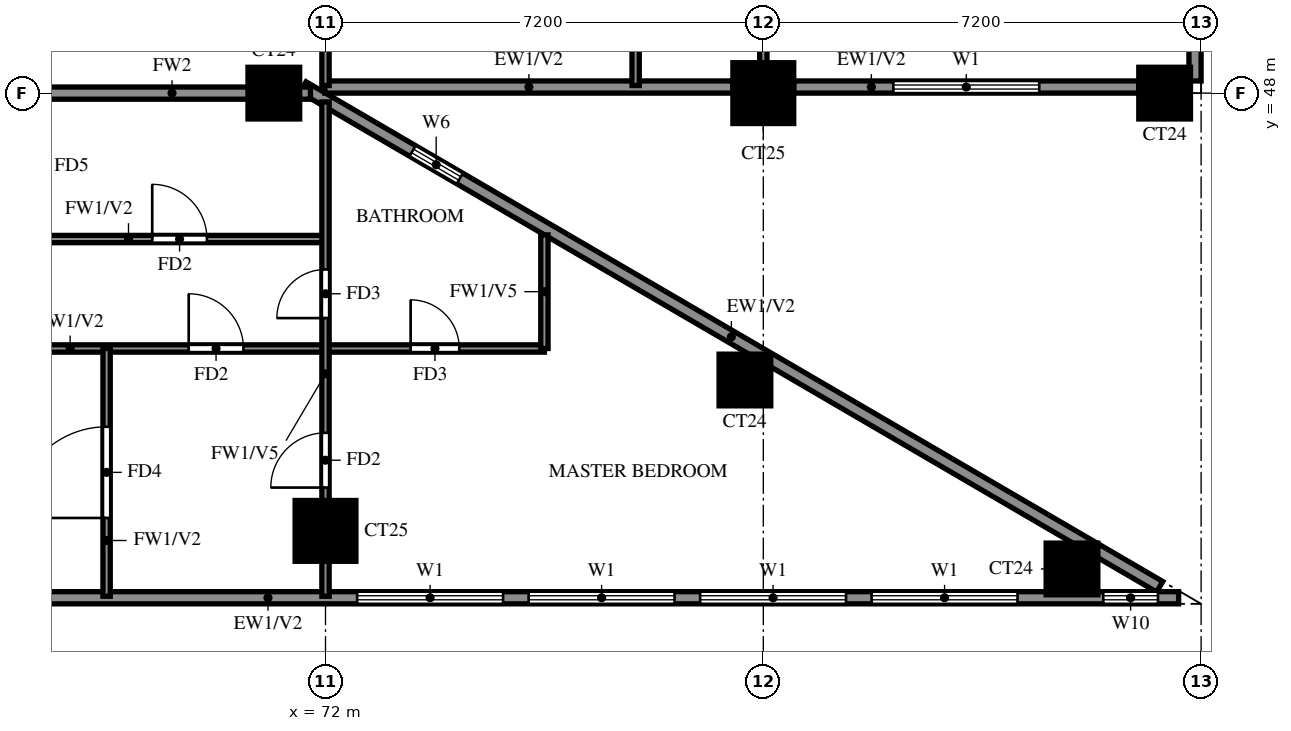
"""IFC4 building model, lengths in metres.
Left out: names, types, materials, properties, quantities, classifications, styles, units other than length and angle.
Written with IfcOpenShell. Run it as: python <this file> out.ifc"""

import sys

from ifc_helpers import new_model, si_unit, direction, frame, frame_2d, origin, origin_2d, place, context, subcontext, project, spatial, rectangle, extrude, source, transform, mapped, element, fill, save


model = new_model("IFC4")
c1 = context("Model", 3, precision=1e-05, world=origin(), true_north=direction((0.0, 1.0)))
c2 = subcontext(c1, "Body", "Model", "MODEL_VIEW")
j1 = project(units=[si_unit("LENGTHUNIT", "METRE"), si_unit("PLANEANGLEUNIT", "RADIAN")], contexts=[c1])
p1 = place(None, origin())
s1 = spatial("IfcSite", under=j1, at=p1, CompositionType="ELEMENT")
p2 = place(p1, origin())
s2 = spatial("IfcBuilding", under=s1, at=p2, CompositionType="ELEMENT")
p3 = place(p2, frame((0.0, 0.0, 164.0)))
s3 = spatial("IfcBuildingStorey", under=s2, at=p3, CompositionType="ELEMENT", Elevation=164.0)
m1 = source(origin(), c2, "Body", "SweptSolid", [
    extrude(rectangle(XDim=0.85, YDim=0.85, at=origin_2d()), origin(), (0.0, 0.0, 1.0), 3.2),
])
p4 = place(p3, frame((84.276, 40.174, 0.0), z_axis=(0.0, 0.0, 1.0), x_axis=(1.0, 0.0, 0.0)))
e1 = element("IfcColumn", 1, at=p4, inside=s3, PredefinedType="COLUMN", context=c2, shape_type="MappedRepresentation", body=[
    mapped(m1, transform((0.0, 0.0, 0.0))),
])
m2 = source(origin(), c2, "Body", "SweptSolid", [
    extrude(rectangle(XDim=1.0, YDim=1.0, at=origin_2d()), origin(), (0.0, 0.0, 1.0), 3.2),
])
p5 = place(p3, frame((72.0, 40.8, 0.0), z_axis=(0.0, 0.0, 1.0), x_axis=(1.0, 0.0, 0.0)))
e2 = element("IfcColumn", 2, at=p5, inside=s3, PredefinedType="COLUMN", context=c2, shape_type="MappedRepresentation", body=[
    mapped(m2, transform((0.0, 0.0, 0.0))),
])
for number, where, z_axis, x_axis in (
    (3, (78.898, 43.282, 0.0), (0.0, 0.0, 1.0), (1.0, 0.0, 0.0)),
    (4, (71.15, 48.0, 0.0), (0.0, 0.0, 1.0), (1.0, 0.0, 0.0)),
):
    element("IfcColumn", number, at=place(p3, frame(where, z_axis=z_axis, x_axis=x_axis)), inside=s3, PredefinedType="COLUMN", context=c2, shape_type="MappedRepresentation", body=[
        mapped(m1, transform((0.0, 0.0, 0.0))),
    ])
p6 = place(p3, frame((79.2, 48.0, 0.0), z_axis=(0.0, 0.0, 1.0), x_axis=(1.0, 0.0, 0.0)))
e5 = element("IfcColumn", 5, at=p6, inside=s3, PredefinedType="COLUMN", context=c2, shape_type="MappedRepresentation", body=[
    mapped(m2, transform((0.0, 0.0, 0.0))),
])
p7 = place(p3, frame((85.8, 48.0, 0.0), z_axis=(0.0, 0.0, 1.0), x_axis=(1.0, 0.0, 0.0)))
e6 = element("IfcColumn", 6, at=p7, inside=s3, PredefinedType="COLUMN", context=c2, shape_type="MappedRepresentation", body=[
    mapped(m1, transform((0.0, 0.0, 0.0))),
])
p8 = place(p3, frame((85.719, 39.881, 0.0), z_axis=(0.0, 0.0, 1.0), x_axis=(-0.86377618652, 0.503875678716, 0.0)))
e7 = element("IfcWall", 7, at=p8, inside=s3, PredefinedType="SOLIDWALL", context=c2, shape_type="SweptSolid", body=[
    extrude(rectangle(XDim=16.311, YDim=0.2, at=frame_2d((8.156, 0.0))), origin(), (0.0, 0.0, 1.0), 3.2),
])
p9 = place(p8, frame((13.326, 0.0, 1.5)))
e8 = element("IfcOpeningElement", 8, at=p9, cuts=e7, PredefinedType="OPENING", context=c2, shape_type="SweptSolid", body=[
    extrude(rectangle(XDim=0.9, YDim=0.9, at=frame_2d((0.45, 0.45))), frame((0.0, 0.11, 0.0), z_axis=(0.0, -1.0, 0.0), x_axis=(1.0, 0.0, 0.0)), (0.0, 0.0, 1.0), 0.22),
])
p10 = place(p3, frame((71.99, 48.1, 0.0), z_axis=(0.0, 0.0, 1.0), x_axis=(1.0, 0.0, 0.0)))
e9 = element("IfcWall", 9, at=p10, inside=s3, PredefinedType="SOLIDWALL", context=c2, shape_type="SweptSolid", body=[
    extrude(rectangle(XDim=6.71, YDim=0.2, at=frame_2d((3.355, 0.0))), origin(), (0.0, 0.0, 1.0), 3.2),
])
p11 = place(p3, frame((79.7, 48.1, 0.0), z_axis=(0.0, 0.0, 1.0), x_axis=(1.0, 0.0, 0.0)))
e10 = element("IfcWall", 10, at=p11, inside=s3, PredefinedType="SOLIDWALL", context=c2, shape_type="SweptSolid", body=[
    extrude(rectangle(XDim=5.675, YDim=0.2, at=frame_2d((2.837, 0.0))), origin(), (0.0, 0.0, 1.0), 3.2),
])
p12 = place(p11, frame((1.637, 0.0, 0.6)))
e11 = element("IfcOpeningElement", 11, at=p12, cuts=e10, PredefinedType="OPENING", context=c2, shape_type="SweptSolid", body=[
    extrude(rectangle(XDim=2.4, YDim=2.4, at=frame_2d((1.2, 1.2))), frame((0.0, 0.11, 0.0), z_axis=(0.0, -1.0, 0.0), x_axis=(1.0, 0.0, 0.0)), (0.0, 0.0, 1.0), 0.22),
])
p13 = place(p3, frame((86.3, 48.2, 0.0), z_axis=(0.0, 0.0, 1.0), x_axis=(0.0, 1.0, 0.0)))
e12 = element("IfcWall", 12, at=p13, inside=s3, PredefinedType="SOLIDWALL", context=c2, shape_type="SweptSolid", body=[
    extrude(rectangle(XDim=28.6, YDim=0.2, at=frame_2d((14.3, 0.0))), origin(), (0.0, 0.0, 1.0), 3.2),
])
p14 = place(p13, frame((0.775, 0.0, 0.6)))
e13 = element("IfcOpeningElement", 13, at=p14, cuts=e12, PredefinedType="OPENING", context=c2, shape_type="SweptSolid", body=[
    extrude(rectangle(XDim=2.4, YDim=2.4, at=frame_2d((1.2, 1.2))), frame((0.0, 0.11, 0.0), z_axis=(0.0, -1.0, 0.0), x_axis=(1.0, 0.0, 0.0)), (0.0, 0.0, 1.0), 0.22),
])
p15 = place(p13, frame((3.65, 0.0, 0.6)))
e14 = element("IfcOpeningElement", 14, at=p15, cuts=e12, PredefinedType="OPENING", context=c2, shape_type="SweptSolid", body=[
    extrude(rectangle(XDim=2.4, YDim=2.4, at=frame_2d((1.2, 1.2))), frame((0.0, 0.11, 0.0), z_axis=(0.0, -1.0, 0.0), x_axis=(1.0, 0.0, 0.0)), (0.0, 0.0, 1.0), 0.22),
])
p16 = place(p13, frame((11.012, 0.0, 0.6)))
e15 = element("IfcOpeningElement", 15, at=p16, cuts=e12, PredefinedType="OPENING", context=c2, shape_type="SweptSolid", body=[
    extrude(rectangle(XDim=2.4, YDim=2.4, at=frame_2d((1.2, 1.2))), frame((0.0, 0.11, 0.0), z_axis=(0.0, -1.0, 0.0), x_axis=(1.0, 0.0, 0.0)), (0.0, 0.0, 1.0), 0.22),
])
p17 = place(p13, frame((8.538, 0.0, 1.5)))
e16 = element("IfcOpeningElement", 16, at=p17, cuts=e12, PredefinedType="OPENING", context=c2, shape_type="SweptSolid", body=[
    extrude(rectangle(XDim=0.9, YDim=0.9, at=frame_2d((0.45, 0.45))), frame((0.0, 0.11, 0.0), z_axis=(0.0, -1.0, 0.0), x_axis=(1.0, 0.0, 0.0)), (0.0, 0.0, 1.0), 0.22),
])
p18 = place(p13, frame((14.988, 0.0, 0.6)))
e17 = element("IfcOpeningElement", 17, at=p18, cuts=e12, PredefinedType="OPENING", context=c2, shape_type="SweptSolid", body=[
    extrude(rectangle(XDim=2.4, YDim=2.4, at=frame_2d((1.2, 1.2))), frame((0.0, 0.11, 0.0), z_axis=(0.0, -1.0, 0.0), x_axis=(1.0, 0.0, 0.0)), (0.0, 0.0, 1.0), 0.22),
])
p19 = place(p13, frame((18.212, 0.0, 0.6)))
e18 = element("IfcOpeningElement", 18, at=p19, cuts=e12, PredefinedType="OPENING", context=c2, shape_type="SweptSolid", body=[
    extrude(rectangle(XDim=2.4, YDim=2.4, at=frame_2d((1.2, 1.2))), frame((0.0, 0.11, 0.0), z_axis=(0.0, -1.0, 0.0), x_axis=(1.0, 0.0, 0.0)), (0.0, 0.0, 1.0), 0.22),
])
p20 = place(p13, frame((22.938, 0.0, 1.5)))
e19 = element("IfcOpeningElement", 19, at=p20, cuts=e12, PredefinedType="OPENING", context=c2, shape_type="SweptSolid", body=[
    extrude(rectangle(XDim=0.9, YDim=0.9, at=frame_2d((0.45, 0.45))), frame((0.0, 0.11, 0.0), z_axis=(0.0, -1.0, 0.0), x_axis=(1.0, 0.0, 0.0)), (0.0, 0.0, 1.0), 0.22),
])
p21 = place(p13, frame((25.413, 0.0, 0.6)))
e20 = element("IfcOpeningElement", 20, at=p21, cuts=e12, PredefinedType="OPENING", context=c2, shape_type="SweptSolid", body=[
    extrude(rectangle(XDim=2.4, YDim=2.4, at=frame_2d((1.2, 1.2))), frame((0.0, 0.11, 0.0), z_axis=(0.0, -1.0, 0.0), x_axis=(1.0, 0.0, 0.0)), (0.0, 0.0, 1.0), 0.22),
])
p22 = place(p3, frame((58.8, 39.7, 0.0), z_axis=(0.0, 0.0, 1.0), x_axis=(1.0, 0.0, 0.0)))
e21 = element("IfcWall", 21, at=p22, inside=s3, PredefinedType="SOLIDWALL", context=c2, shape_type="SweptSolid", body=[
    extrude(rectangle(XDim=27.23, YDim=0.2, at=frame_2d((13.615, 0.0))), origin(), (0.0, 0.0, 1.0), 3.2),
])
p23 = place(p22, frame((2.433, 0.0, 0.6)))
e22 = element("IfcOpeningElement", 22, at=p23, cuts=e21, PredefinedType="OPENING", context=c2, shape_type="SweptSolid", body=[
    extrude(rectangle(XDim=2.4, YDim=2.4, at=frame_2d((1.2, 1.2))), frame((0.0, 0.11, 0.0), z_axis=(0.0, -1.0, 0.0), x_axis=(1.0, 0.0, 0.0)), (0.0, 0.0, 1.0), 0.22),
])
p24 = place(p22, frame((5.967, 0.0, 0.6)))
e23 = element("IfcOpeningElement", 23, at=p24, cuts=e21, PredefinedType="OPENING", context=c2, shape_type="SweptSolid", body=[
    extrude(rectangle(XDim=2.4, YDim=2.4, at=frame_2d((1.2, 1.2))), frame((0.0, 0.11, 0.0), z_axis=(0.0, -1.0, 0.0), x_axis=(1.0, 0.0, 0.0)), (0.0, 0.0, 1.0), 0.22),
])
p25 = place(p22, frame((13.72, 0.0, 0.6)))
e24 = element("IfcOpeningElement", 24, at=p25, cuts=e21, PredefinedType="OPENING", context=c2, shape_type="SweptSolid", body=[
    extrude(rectangle(XDim=2.4, YDim=2.4, at=frame_2d((1.2, 1.2))), frame((0.0, 0.11, 0.0), z_axis=(0.0, -1.0, 0.0), x_axis=(1.0, 0.0, 0.0)), (0.0, 0.0, 1.0), 0.22),
])
p26 = place(p22, frame((16.541, 0.0, 0.6)))
e25 = element("IfcOpeningElement", 25, at=p26, cuts=e21, PredefinedType="OPENING", context=c2, shape_type="SweptSolid", body=[
    extrude(rectangle(XDim=2.4, YDim=2.4, at=frame_2d((1.2, 1.2))), frame((0.0, 0.11, 0.0), z_axis=(0.0, -1.0, 0.0), x_axis=(1.0, 0.0, 0.0)), (0.0, 0.0, 1.0), 0.22),
])
p27 = place(p22, frame((19.361, 0.0, 0.6)))
e26 = element("IfcOpeningElement", 26, at=p27, cuts=e21, PredefinedType="OPENING", context=c2, shape_type="SweptSolid", body=[
    extrude(rectangle(XDim=2.4, YDim=2.4, at=frame_2d((1.2, 1.2))), frame((0.0, 0.11, 0.0), z_axis=(0.0, -1.0, 0.0), x_axis=(1.0, 0.0, 0.0)), (0.0, 0.0, 1.0), 0.22),
])
p28 = place(p22, frame((22.181, 0.0, 0.6)))
e27 = element("IfcOpeningElement", 27, at=p28, cuts=e21, PredefinedType="OPENING", context=c2, shape_type="SweptSolid", body=[
    extrude(rectangle(XDim=2.4, YDim=2.4, at=frame_2d((1.2, 1.2))), frame((0.0, 0.11, 0.0), z_axis=(0.0, -1.0, 0.0), x_axis=(1.0, 0.0, 0.0)), (0.0, 0.0, 1.0), 0.22),
])
p29 = place(p22, frame((25.99, 0.0, 0.6)))
e28 = element("IfcOpeningElement", 28, at=p29, cuts=e21, PredefinedType="OPENING", context=c2, shape_type="SweptSolid", body=[
    extrude(rectangle(XDim=0.9, YDim=2.4, at=frame_2d((0.45, 1.2))), frame((0.0, 0.11, 0.0), z_axis=(0.0, -1.0, 0.0), x_axis=(1.0, 0.0, 0.0)), (0.0, 0.0, 1.0), 0.22),
])
p30 = place(p3, frame((67.2, 48.0, 0.0), z_axis=(0.0, 0.0, 1.0), x_axis=(1.0, 0.0, 0.0)))
e29 = element("IfcWall", 29, at=p30, inside=s3, PredefinedType="SOLIDWALL", context=c2, shape_type="SweptSolid", body=[
    extrude(rectangle(XDim=4.552, YDim=0.2, at=frame_2d((2.276, 0.0))), origin(), (0.0, 0.0, 1.0), 3.2),
])
p31 = place(p3, frame((60.0, 43.8, 0.0), z_axis=(0.0, 0.0, 1.0), x_axis=(1.0, 0.0, 0.0)))
e30 = element("IfcWall", 30, at=p31, inside=s3, PredefinedType="PARTITIONING", context=c2, shape_type="SweptSolid", body=[
    extrude(rectangle(XDim=15.6, YDim=0.12, at=frame_2d((7.8, 0.0))), origin(), (0.0, 0.0, 1.0), 3.2),
])
p32 = place(p31, frame((9.75, 0.0, 0.0)))
e31 = element("IfcOpeningElement", 31, at=p32, cuts=e30, PredefinedType="OPENING", context=c2, shape_type="SweptSolid", body=[
    extrude(rectangle(XDim=0.9, YDim=2.1, at=frame_2d((0.45, 1.05))), frame((0.0, 0.07, 0.0), z_axis=(0.0, -1.0, 0.0), x_axis=(1.0, 0.0, 0.0)), (0.0, 0.0, 1.0), 0.14),
])
p33 = place(p31, frame((3.45, 0.0, 0.0)))
e32 = element("IfcOpeningElement", 32, at=p33, cuts=e30, PredefinedType="OPENING", context=c2, shape_type="SweptSolid", body=[
    extrude(rectangle(XDim=1.5, YDim=2.1, at=frame_2d((0.75, 1.05))), frame((0.0, 0.07, 0.0), z_axis=(0.0, -1.0, 0.0), x_axis=(1.0, 0.0, 0.0)), (0.0, 0.0, 1.0), 0.14),
])
p34 = place(p31, frame((13.4, 0.0, 0.0)))
e33 = element("IfcOpeningElement", 33, at=p34, cuts=e30, PredefinedType="OPENING", context=c2, shape_type="SweptSolid", body=[
    extrude(rectangle(XDim=0.8, YDim=2.1, at=frame_2d((0.4, 1.05))), frame((0.0, 0.07, 0.0), z_axis=(0.0, -1.0, 0.0), x_axis=(1.0, 0.0, 0.0)), (0.0, 0.0, 1.0), 0.14),
])
p35 = place(p3, frame((67.2, 45.6, 0.0), z_axis=(0.0, 0.0, 1.0), x_axis=(1.0, 0.0, 0.0)))
e34 = element("IfcWall", 34, at=p35, inside=s3, PredefinedType="PARTITIONING", context=c2, shape_type="SweptSolid", body=[
    extrude(rectangle(XDim=4.8, YDim=0.12, at=frame_2d((2.4, 0.0))), origin(), (0.0, 0.0, 1.0), 3.2),
])
p36 = place(p35, frame((1.95, 0.0, 0.0)))
e35 = element("IfcOpeningElement", 35, at=p36, cuts=e34, PredefinedType="OPENING", context=c2, shape_type="SweptSolid", body=[
    extrude(rectangle(XDim=0.9, YDim=2.1, at=frame_2d((0.45, 1.05))), frame((0.0, 0.07, 0.0), z_axis=(0.0, -1.0, 0.0), x_axis=(1.0, 0.0, 0.0)), (0.0, 0.0, 1.0), 0.14),
])
p37 = place(p3, frame((68.4, 39.725, 0.0), z_axis=(0.0, 0.0, 1.0), x_axis=(0.0, 1.0, 0.0)))
e36 = element("IfcWall", 36, at=p37, inside=s3, PredefinedType="PARTITIONING", context=c2, shape_type="SweptSolid", body=[
    extrude(rectangle(XDim=4.075, YDim=0.12, at=frame_2d((2.038, 0.0))), origin(), (0.0, 0.0, 1.0), 3.2),
])
p38 = place(p37, frame((1.288, 0.0, 0.0)))
e37 = element("IfcOpeningElement", 37, at=p38, cuts=e36, PredefinedType="OPENING", context=c2, shape_type="SweptSolid", body=[
    extrude(rectangle(XDim=1.5, YDim=2.1, at=frame_2d((0.75, 1.05))), frame((0.0, 0.07, 0.0), z_axis=(0.0, -1.0, 0.0), x_axis=(1.0, 0.0, 0.0)), (0.0, 0.0, 1.0), 0.14),
])
p39 = place(p3, frame((72.0, 39.725, 0.0), z_axis=(0.0, 0.0, 1.0), x_axis=(0.0, 1.0, 0.0)))
e38 = element("IfcWall", 38, at=p39, inside=s3, PredefinedType="PARTITIONING", context=c2, shape_type="SweptSolid", body=[
    extrude(rectangle(XDim=8.13, YDim=0.12, at=frame_2d((4.065, 0.0))), origin(), (0.0, 0.0, 1.0), 2.3),
])
p40 = place(p39, frame((1.788, 0.0, 0.0)))
e39 = element("IfcOpeningElement", 39, at=p40, cuts=e38, PredefinedType="OPENING", context=c2, shape_type="SweptSolid", body=[
    extrude(rectangle(XDim=0.9, YDim=2.1, at=frame_2d((0.45, 1.05))), frame((0.0, 0.07, 0.0), z_axis=(0.0, -1.0, 0.0), x_axis=(1.0, 0.0, 0.0)), (0.0, 0.0, 1.0), 0.14),
])
p41 = place(p39, frame((4.575, 0.0, 0.0)))
e40 = element("IfcOpeningElement", 40, at=p41, cuts=e38, PredefinedType="OPENING", context=c2, shape_type="SweptSolid", body=[
    extrude(rectangle(XDim=0.8, YDim=2.1, at=frame_2d((0.4, 1.05))), frame((0.0, 0.07, 0.0), z_axis=(0.0, -1.0, 0.0), x_axis=(1.0, 0.0, 0.0)), (0.0, 0.0, 1.0), 0.14),
])
p42 = place(p3, frame((72.0, 48.125, 0.0), z_axis=(0.0, 0.0, 1.0), x_axis=(0.0, 1.0, 0.0)))
e41 = element("IfcWall", 41, at=p42, inside=s3, PredefinedType="PARTITIONING", context=c2, shape_type="SweptSolid", body=[
    extrude(rectangle(XDim=3.475, YDim=0.12, at=frame_2d((1.738, 0.0))), origin(), (0.0, 0.0, 1.0), 3.2),
])
p43 = place(p3, frame((75.6, 43.8, 0.0), z_axis=(0.0, 0.0, 1.0), x_axis=(0.0, 1.0, 0.0)))
e42 = element("IfcWall", 42, at=p43, inside=s3, PredefinedType="PARTITIONING", context=c2, shape_type="SweptSolid", body=[
    extrude(rectangle(XDim=1.868, YDim=0.12, at=frame_2d((0.934, 0.0))), origin(), (0.0, 0.0, 1.0), 2.3),
])
p44 = place(p3, frame((77.1, 48.125, 0.0), z_axis=(0.0, 0.0, 1.0), x_axis=(0.0, 1.0, 0.0)))
e43 = element("IfcWall", 43, at=p44, inside=s3, PredefinedType="PARTITIONING", context=c2, shape_type="SweptSolid", body=[
    extrude(rectangle(XDim=3.475, YDim=0.12, at=frame_2d((1.738, 0.0))), origin(), (0.0, 0.0, 1.0), 3.2),
])
p45 = place(p3, frame((79.2, 48.125, 0.0), z_axis=(0.0, 0.0, 1.0), x_axis=(0.0, 1.0, 0.0)))
e44 = element("IfcWall", 44, at=p45, inside=s3, PredefinedType="PARTITIONING", context=c2, shape_type="SweptSolid", body=[
    extrude(rectangle(XDim=7.075, YDim=0.12, at=frame_2d((3.538, 0.0))), origin(), (0.0, 0.0, 1.0), 3.2),
])
p46 = place(p45, frame((2.788, 0.0, 0.0)))
e45 = element("IfcOpeningElement", 45, at=p46, cuts=e44, PredefinedType="OPENING", context=c2, shape_type="SweptSolid", body=[
    extrude(rectangle(XDim=1.5, YDim=2.1, at=frame_2d((0.75, 1.05))), frame((0.0, 0.07, 0.0), z_axis=(0.0, -1.0, 0.0), x_axis=(1.0, 0.0, 0.0)), (0.0, 0.0, 1.0), 0.14),
])
p47 = place(p9, origin())
e46 = element("IfcWindow", 46, at=p47, inside=s3, PartitioningType="SINGLE_PANEL", PredefinedType="WINDOW", context=c2, shape_type="SweptSolid", body=[
    extrude(rectangle(XDim=0.9, YDim=0.9, at=frame_2d((0.45, 0.45))), frame((0.0, 0.03, 0.0), z_axis=(0.0, -1.0, 0.0), x_axis=(1.0, 0.0, 0.0)), (0.0, 0.0, 1.0), 0.06),
])
fill(e8, e46)
p48 = place(p12, origin())
e47 = element("IfcWindow", 47, at=p48, inside=s3, PartitioningType="DOUBLE_PANEL_VERTICAL", PredefinedType="WINDOW", context=c2, shape_type="SweptSolid", body=[
    extrude(rectangle(XDim=2.4, YDim=2.4, at=frame_2d((1.2, 1.2))), frame((0.0, 0.03, 0.0), z_axis=(0.0, -1.0, 0.0), x_axis=(1.0, 0.0, 0.0)), (0.0, 0.0, 1.0), 0.06),
])
fill(e11, e47)
p49 = place(p25, origin())
e48 = element("IfcWindow", 48, at=p49, inside=s3, PartitioningType="DOUBLE_PANEL_VERTICAL", PredefinedType="WINDOW", context=c2, shape_type="SweptSolid", body=[
    extrude(rectangle(XDim=2.4, YDim=2.4, at=frame_2d((1.2, 1.2))), frame((0.0, 0.03, 0.0), z_axis=(0.0, -1.0, 0.0), x_axis=(1.0, 0.0, 0.0)), (0.0, 0.0, 1.0), 0.06),
])
fill(e24, e48)
p50 = place(p26, origin())
e49 = element("IfcWindow", 49, at=p50, inside=s3, PartitioningType="DOUBLE_PANEL_VERTICAL", PredefinedType="WINDOW", context=c2, shape_type="SweptSolid", body=[
    extrude(rectangle(XDim=2.4, YDim=2.4, at=frame_2d((1.2, 1.2))), frame((0.0, 0.03, 0.0), z_axis=(0.0, -1.0, 0.0), x_axis=(1.0, 0.0, 0.0)), (0.0, 0.0, 1.0), 0.06),
])
fill(e25, e49)
p51 = place(p27, origin())
e50 = element("IfcWindow", 50, at=p51, inside=s3, PartitioningType="DOUBLE_PANEL_VERTICAL", PredefinedType="WINDOW", context=c2, shape_type="SweptSolid", body=[
    extrude(rectangle(XDim=2.4, YDim=2.4, at=frame_2d((1.2, 1.2))), frame((0.0, 0.03, 0.0), z_axis=(0.0, -1.0, 0.0), x_axis=(1.0, 0.0, 0.0)), (0.0, 0.0, 1.0), 0.06),
])
fill(e26, e50)
p52 = place(p28, origin())
e51 = element("IfcWindow", 51, at=p52, inside=s3, PartitioningType="DOUBLE_PANEL_VERTICAL", PredefinedType="WINDOW", context=c2, shape_type="SweptSolid", body=[
    extrude(rectangle(XDim=2.4, YDim=2.4, at=frame_2d((1.2, 1.2))), frame((0.0, 0.03, 0.0), z_axis=(0.0, -1.0, 0.0), x_axis=(1.0, 0.0, 0.0)), (0.0, 0.0, 1.0), 0.06),
])
fill(e27, e51)
p53 = place(p29, origin())
e52 = element("IfcWindow", 52, at=p53, inside=s3, PartitioningType="SINGLE_PANEL", PredefinedType="WINDOW", context=c2, shape_type="SweptSolid", body=[
    extrude(rectangle(XDim=0.9, YDim=2.4, at=frame_2d((0.45, 1.2))), frame((0.0, 0.03, 0.0), z_axis=(0.0, -1.0, 0.0), x_axis=(1.0, 0.0, 0.0)), (0.0, 0.0, 1.0), 0.06),
])
fill(e28, e52)
p54 = place(p38, origin())
e53 = element("IfcDoor", 53, at=p54, inside=s3, OperationType="SINGLE_SWING_LEFT", PredefinedType="DOOR", context=c2, shape_type="SweptSolid", body=[
    extrude(rectangle(XDim=1.5, YDim=2.1, at=frame_2d((0.75, 1.05))), frame((0.0, 0.025, 0.0), z_axis=(0.0, -1.0, 0.0), x_axis=(1.0, 0.0, 0.0)), (0.0, 0.0, 1.0), 0.05),
])
fill(e37, e53)
p55 = place(p36, origin())
e54 = element("IfcDoor", 54, at=p55, inside=s3, OperationType="SINGLE_SWING_RIGHT", PredefinedType="DOOR", context=c2, shape_type="SweptSolid", body=[
    extrude(rectangle(XDim=0.9, YDim=2.1, at=frame_2d((0.45, 1.05))), frame((0.0, 0.025, 0.0), z_axis=(0.0, -1.0, 0.0), x_axis=(1.0, 0.0, 0.0)), (0.0, 0.0, 1.0), 0.05),
])
fill(e35, e54)
p56 = place(p32, origin())
e55 = element("IfcDoor", 55, at=p56, inside=s3, OperationType="SINGLE_SWING_LEFT", PredefinedType="DOOR", context=c2, shape_type="SweptSolid", body=[
    extrude(rectangle(XDim=0.9, YDim=2.1, at=frame_2d((0.45, 1.05))), frame((0.0, 0.025, 0.0), z_axis=(0.0, -1.0, 0.0), x_axis=(1.0, 0.0, 0.0)), (0.0, 0.0, 1.0), 0.05),
])
fill(e31, e55)
p57 = place(p40, origin())
e56 = element("IfcDoor", 56, at=p57, inside=s3, OperationType="SINGLE_SWING_RIGHT", PredefinedType="DOOR", context=c2, shape_type="SweptSolid", body=[
    extrude(rectangle(XDim=0.9, YDim=2.1, at=frame_2d((0.45, 1.05))), frame((0.0, 0.025, 0.0), z_axis=(0.0, -1.0, 0.0), x_axis=(1.0, 0.0, 0.0)), (0.0, 0.0, 1.0), 0.05),
])
fill(e39, e56)
p58 = place(p41, origin())
e57 = element("IfcDoor", 57, at=p58, inside=s3, OperationType="SINGLE_SWING_LEFT", PredefinedType="DOOR", context=c2, shape_type="SweptSolid", body=[
    extrude(rectangle(XDim=0.8, YDim=2.1, at=frame_2d((0.4, 1.05))), frame((0.0, 0.025, 0.0), z_axis=(0.0, -1.0, 0.0), x_axis=(1.0, 0.0, 0.0)), (0.0, 0.0, 1.0), 0.05),
])
fill(e40, e57)
p59 = place(p34, origin())
e58 = element("IfcDoor", 58, at=p59, inside=s3, OperationType="SINGLE_SWING_RIGHT", PredefinedType="DOOR", context=c2, shape_type="SweptSolid", body=[
    extrude(rectangle(XDim=0.8, YDim=2.1, at=frame_2d((0.4, 1.05))), frame((0.0, 0.025, 0.0), z_axis=(0.0, -1.0, 0.0), x_axis=(1.0, 0.0, 0.0)), (0.0, 0.0, 1.0), 0.05),
])
fill(e33, e58)
save(model, sys.argv[1])
